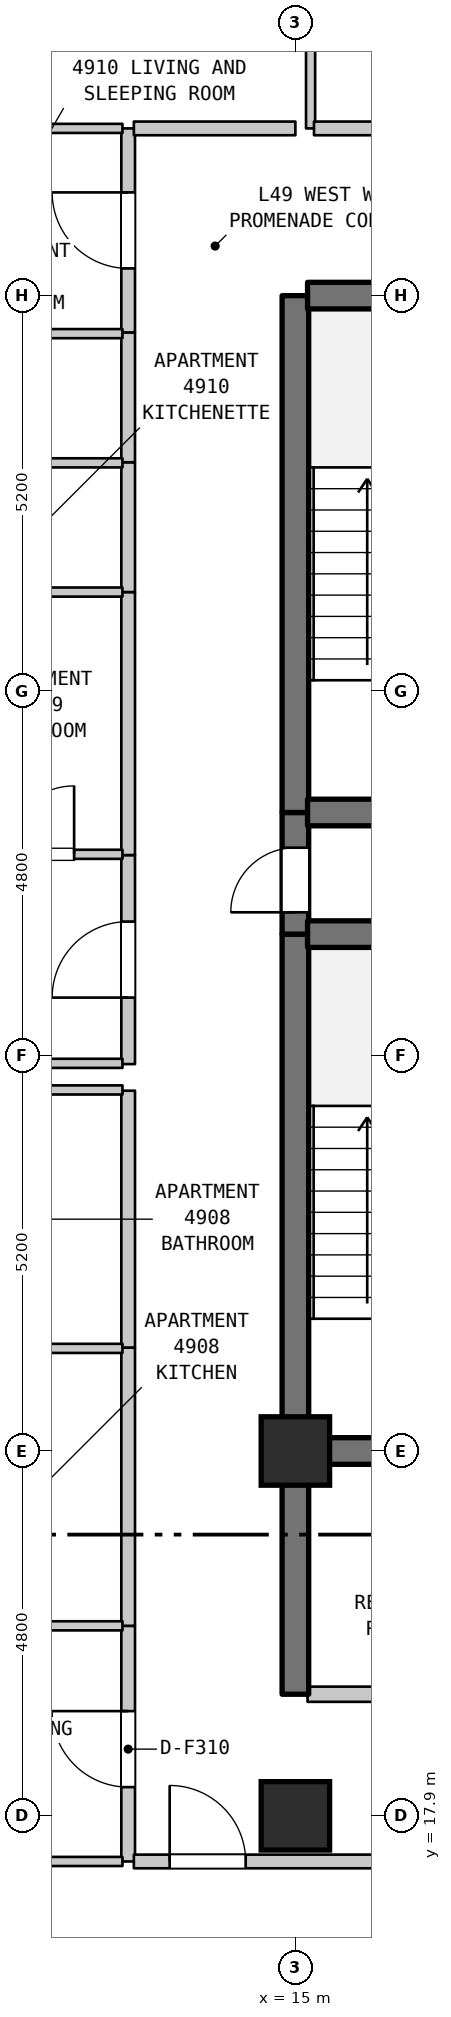
"""IFC4 building model, lengths in metres.
Left out: names, types, materials, properties, quantities, classifications, styles, units other than length and angle.
Written with IfcOpenShell. Run it as: python <this file> out.ifc"""

import sys

from ifc_helpers import new_model, si_unit, direction, frame, frame_2d, origin, origin_2d, place, context, subcontext, project, spatial, rectangle, extrude, element, fill, save


model = new_model("IFC4")
c1 = context("Model", 3, precision=1e-05, world=origin(), true_north=direction((0.0, 1.0)))
c2 = subcontext(c1, "Body", "Model", "MODEL_VIEW")
j1 = project(units=[si_unit("LENGTHUNIT", "METRE"), si_unit("PLANEANGLEUNIT", "RADIAN")], contexts=[c1])
p1 = place(None, origin())
s1 = spatial("IfcSite", under=j1, at=p1, CompositionType="ELEMENT")
p2 = place(p1, origin())
s2 = spatial("IfcBuilding", under=s1, at=p2, CompositionType="ELEMENT")
p3 = place(p2, frame((0.0, 0.0, 199.5)))
s3 = spatial("IfcBuildingStorey", under=s2, at=p3, CompositionType="ELEMENT", Elevation=199.5)
for number, where, z_axis, x_axis in (
    (1, (15.0, 17.9, 0.0), (0.0, 0.0, 1.0), (1.0, 0.0, 0.0)),
    (2, (15.0, 22.7, 0.0), (0.0, 0.0, 1.0), (1.0, 0.0, 0.0)),
):
    element("IfcColumn", number, at=place(p3, frame(where, z_axis=z_axis, x_axis=x_axis)), inside=s3, PredefinedType="COLUMN", context=c2, shape_type="SweptSolid", body=[
        extrude(rectangle(XDim=0.9, YDim=0.9, at=origin_2d()), origin(), (0.0, 0.0, 1.0), 3.7),
    ])
p4 = place(p3, frame((12.8, 17.3, 0.0), z_axis=(0.0, 0.0, 1.0), x_axis=(0.0, 1.0, 0.0)))
e3 = element("IfcWall", 3, at=p4, inside=s3, PredefinedType="STANDARD", context=c2, shape_type="SweptSolid", body=[
    extrude(rectangle(XDim=3.1, YDim=0.18, at=frame_2d((1.55, 0.0))), origin(), (0.0, 0.0, 1.0), 3.39),
])
p5 = place(p4, frame((0.978, 0.0, 0.0)))
e4 = element("IfcOpeningElement", 4, at=p5, cuts=e3, PredefinedType="OPENING", context=c2, shape_type="SweptSolid", body=[
    extrude(rectangle(XDim=1.0, YDim=2.15, at=frame_2d((0.5, 1.075))), frame((0.0, 0.1, 0.0), z_axis=(0.0, -1.0, 0.0), x_axis=(1.0, 0.0, 0.0)), (0.0, 0.0, 1.0), 0.2),
])
p6 = place(p3, frame((12.8, 20.4, 0.0), z_axis=(0.0, 0.0, 1.0), x_axis=(0.0, 1.0, 0.0)))
e5 = element("IfcWall", 5, at=p6, inside=s3, PredefinedType="STANDARD", context=c2, shape_type="SweptSolid", body=[
    extrude(rectangle(XDim=3.661, YDim=0.18, at=frame_2d((1.831, 0.0))), origin(), (0.0, 0.0, 1.0), 3.39),
])
p7 = place(p3, frame((12.8, 24.061, 0.0), z_axis=(0.0, 0.0, 1.0), x_axis=(0.0, 1.0, 0.0)))
e6 = element("IfcWall", 6, at=p7, inside=s3, PredefinedType="STANDARD", context=c2, shape_type="SweptSolid", body=[
    extrude(rectangle(XDim=3.379, YDim=0.18, at=frame_2d((1.689, 0.0))), origin(), (0.0, 0.0, 1.0), 3.39),
])
p8 = place(p3, frame((12.8, 27.79, 0.0), z_axis=(0.0, 0.0, 1.0), x_axis=(0.0, 1.0, 0.0)))
e7 = element("IfcWall", 7, at=p8, inside=s3, PredefinedType="STANDARD", context=c2, shape_type="SweptSolid", body=[
    extrude(rectangle(XDim=2.75, YDim=0.18, at=frame_2d((1.375, 0.0))), origin(), (0.0, 0.0, 1.0), 3.39),
])
p9 = place(p8, frame((0.875, 0.0, 0.0)))
e8 = element("IfcOpeningElement", 8, at=p9, cuts=e7, PredefinedType="OPENING", context=c2, shape_type="SweptSolid", body=[
    extrude(rectangle(XDim=1.0, YDim=2.15, at=frame_2d((0.5, 1.075))), frame((0.0, 0.1, 0.0), z_axis=(0.0, -1.0, 0.0), x_axis=(1.0, 0.0, 0.0)), (0.0, 0.0, 1.0), 0.2),
])
p10 = place(p3, frame((12.8, 30.54, 0.0), z_axis=(0.0, 0.0, 1.0), x_axis=(0.0, 1.0, 0.0)))
e9 = element("IfcWall", 9, at=p10, inside=s3, PredefinedType="STANDARD", context=c2, shape_type="SweptSolid", body=[
    extrude(rectangle(XDim=3.46, YDim=0.18, at=frame_2d((1.73, 0.0))), origin(), (0.0, 0.0, 1.0), 3.39),
])
for number, where, z_axis, x_axis in (
    (10, (12.8, 34.0, 0.0), (0.0, 0.0, 1.0), (0.0, 1.0, 0.0)),
    (11, (12.8, 35.708, 0.0), (0.0, 0.0, 1.0), (0.0, 1.0, 0.0)),
):
    element("IfcWall", number, at=place(p3, frame(where, z_axis=z_axis, x_axis=x_axis)), inside=s3, PredefinedType="STANDARD", context=c2, shape_type="SweptSolid", body=[
        extrude(rectangle(XDim=1.708, YDim=0.18, at=frame_2d((0.854, 0.0))), origin(), (0.0, 0.0, 1.0), 3.39),
    ])
p11 = place(p3, frame((12.8, 37.416, 0.0), z_axis=(0.0, 0.0, 1.0), x_axis=(0.0, 1.0, 0.0)))
e12 = element("IfcWall", 12, at=p11, inside=s3, PredefinedType="STANDARD", context=c2, shape_type="SweptSolid", body=[
    extrude(rectangle(XDim=2.684, YDim=0.18, at=frame_2d((1.342, 0.0))), origin(), (0.0, 0.0, 1.0), 3.39),
])
p12 = place(p11, frame((0.842, 0.0, 0.0)))
e13 = element("IfcOpeningElement", 13, at=p12, cuts=e12, PredefinedType="OPENING", context=c2, shape_type="SweptSolid", body=[
    extrude(rectangle(XDim=1.0, YDim=2.15, at=frame_2d((0.5, 1.075))), frame((0.0, 0.1, 0.0), z_axis=(0.0, -1.0, 0.0), x_axis=(1.0, 0.0, 0.0)), (0.0, 0.0, 1.0), 0.2),
])
p13 = place(p3, frame((15.0, 19.5, 0.0), z_axis=(0.0, 0.0, 1.0), x_axis=(0.0, 1.0, 0.0)))
e14 = element("IfcWall", 14, at=p13, inside=s3, PredefinedType="SHEAR", context=c2, shape_type="SweptSolid", body=[
    extrude(rectangle(XDim=3.2, YDim=0.35, at=frame_2d((1.6, 0.0))), origin(), (0.0, 0.0, 1.0), 3.39),
])
p14 = place(p3, frame((15.0, 22.7, 0.0), z_axis=(0.0, 0.0, 1.0), x_axis=(0.0, 1.0, 0.0)))
e15 = element("IfcWall", 15, at=p14, inside=s3, PredefinedType="SHEAR", context=c2, shape_type="SweptSolid", body=[
    extrude(rectangle(XDim=6.8, YDim=0.35, at=frame_2d((3.4, 0.0))), origin(), (0.0, 0.0, 1.0), 3.39),
])
p15 = place(p3, frame((15.0, 29.5, 0.0), z_axis=(0.0, 0.0, 1.0), x_axis=(0.0, 1.0, 0.0)))
e16 = element("IfcWall", 16, at=p15, inside=s3, PredefinedType="SHEAR", context=c2, shape_type="SweptSolid", body=[
    extrude(rectangle(XDim=1.6, YDim=0.35, at=frame_2d((0.8, 0.0))), origin(), (0.0, 0.0, 1.0), 3.39),
])
p16 = place(p15, frame((0.287, 0.0, 0.0)))
e17 = element("IfcOpeningElement", 17, at=p16, cuts=e16, PredefinedType="OPENING", context=c2, shape_type="SweptSolid", body=[
    extrude(rectangle(XDim=0.85, YDim=2.1, at=frame_2d((0.425, 1.05))), frame((0.0, 0.185, 0.0), z_axis=(0.0, -1.0, 0.0), x_axis=(1.0, 0.0, 0.0)), (0.0, 0.0, 1.0), 0.37),
])
p17 = place(p3, frame((15.0, 31.1, 0.0), z_axis=(0.0, 0.0, 1.0), x_axis=(0.0, 1.0, 0.0)))
e18 = element("IfcWall", 18, at=p17, inside=s3, PredefinedType="SHEAR", context=c2, shape_type="SweptSolid", body=[
    extrude(rectangle(XDim=6.8, YDim=0.35, at=frame_2d((3.4, 0.0))), origin(), (0.0, 0.0, 1.0), 3.39),
])
p18 = place(p3, frame((15.2, 40.1, 0.0), z_axis=(0.0, 0.0, 1.0), x_axis=(0.0, 1.0, 0.0)))
e19 = element("IfcWall", 19, at=p18, inside=s3, PredefinedType="PARTITIONING", context=c2, shape_type="SweptSolid", body=[
    extrude(rectangle(XDim=3.2, YDim=0.12, at=frame_2d((1.6, 0.0))), origin(), (0.0, 0.0, 1.0), 3.39),
])
p19 = place(p3, frame((9.085, 17.3, 0.0), z_axis=(0.0, 0.0, 1.0), x_axis=(1.0, 0.0, 0.0)))
e20 = element("IfcWall", 20, at=p19, inside=s3, PredefinedType="PARTITIONING", context=c2, shape_type="SweptSolid", body=[
    extrude(rectangle(XDim=3.64, YDim=0.12, at=frame_2d((1.82, 0.0))), origin(), (0.0, 0.0, 1.0), 3.39),
])
p20 = place(p3, frame((12.875, 17.3, 0.0), z_axis=(0.0, 0.0, 1.0), x_axis=(1.0, 0.0, 0.0)))
e21 = element("IfcWall", 21, at=p20, inside=s3, PredefinedType="STANDARD", context=c2, shape_type="SweptSolid", body=[
    extrude(rectangle(XDim=3.28, YDim=0.18, at=frame_2d((1.64, 0.0))), origin(), (0.0, 0.0, 1.0), 3.39),
])
p21 = place(p20, frame((0.471, 0.0, 0.0)))
e22 = element("IfcOpeningElement", 22, at=p21, cuts=e21, PredefinedType="OPENING", context=c2, shape_type="SweptSolid", body=[
    extrude(rectangle(XDim=1.0, YDim=2.15, at=frame_2d((0.5, 1.075))), frame((0.0, 0.1, 0.0), z_axis=(0.0, -1.0, 0.0), x_axis=(1.0, 0.0, 0.0)), (0.0, 0.0, 1.0), 0.2),
])
p22 = place(p3, frame((15.16, 19.5, 0.0), z_axis=(0.0, 0.0, 1.0), x_axis=(1.0, 0.0, 0.0)))
e23 = element("IfcWall", 23, at=p22, inside=s3, PredefinedType="STANDARD", context=c2, shape_type="SweptSolid", body=[
    extrude(rectangle(XDim=3.68, YDim=0.2, at=frame_2d((1.84, 0.0))), origin(), (0.0, 0.0, 1.0), 3.39),
])
p23 = place(p22, frame((1.39, 0.0, 0.0)))
e24 = element("IfcOpeningElement", 24, at=p23, cuts=e23, PredefinedType="OPENING", context=c2, shape_type="SweptSolid", body=[
    extrude(rectangle(XDim=0.9, YDim=2.15, at=frame_2d((0.45, 1.075))), frame((0.0, 0.11, 0.0), z_axis=(0.0, -1.0, 0.0), x_axis=(1.0, 0.0, 0.0)), (0.0, 0.0, 1.0), 0.22),
])
p24 = place(p3, frame((10.595, 20.4, 0.0), z_axis=(0.0, 0.0, 1.0), x_axis=(1.0, 0.0, 0.0)))
e25 = element("IfcWall", 25, at=p24, inside=s3, PredefinedType="PARTITIONING", context=c2, shape_type="SweptSolid", body=[
    extrude(rectangle(XDim=2.13, YDim=0.12, at=frame_2d((1.065, 0.0))), origin(), (0.0, 0.0, 1.0), 3.39),
])
p25 = place(p3, frame((15.16, 22.7, 0.0), z_axis=(0.0, 0.0, 1.0), x_axis=(1.0, 0.0, 0.0)))
e26 = element("IfcWall", 26, at=p25, inside=s3, PredefinedType="SHEAR", context=c2, shape_type="SweptSolid", body=[
    extrude(rectangle(XDim=3.68, YDim=0.35, at=frame_2d((1.84, 0.0))), origin(), (0.0, 0.0, 1.0), 3.39),
])
for number, where, z_axis, x_axis in (
    (27, (10.595, 24.05, 0.0), (0.0, 0.0, 1.0), (1.0, 0.0, 0.0)),
    (28, (10.595, 27.45, 0.0), (0.0, 0.0, 1.0), (1.0, 0.0, 0.0)),
):
    element("IfcWall", number, at=place(p3, frame(where, z_axis=z_axis, x_axis=x_axis)), inside=s3, PredefinedType="PARTITIONING", context=c2, shape_type="SweptSolid", body=[
        extrude(rectangle(XDim=2.13, YDim=0.12, at=frame_2d((1.065, 0.0))), origin(), (0.0, 0.0, 1.0), 3.39),
    ])
p26 = place(p3, frame((9.03, 27.8, 0.0), z_axis=(0.0, 0.0, 1.0), x_axis=(1.0, 0.0, 0.0)))
e29 = element("IfcWall", 29, at=p26, inside=s3, PredefinedType="PARTITIONING", context=c2, shape_type="SweptSolid", body=[
    extrude(rectangle(XDim=3.695, YDim=0.12, at=frame_2d((1.848, 0.0))), origin(), (0.0, 0.0, 1.0), 3.39),
])
p27 = place(p3, frame((15.16, 29.5, 0.0), z_axis=(0.0, 0.0, 1.0), x_axis=(1.0, 0.0, 0.0)))
e30 = element("IfcWall", 30, at=p27, inside=s3, PredefinedType="SHEAR", context=c2, shape_type="SweptSolid", body=[
    extrude(rectangle(XDim=3.68, YDim=0.35, at=frame_2d((1.84, 0.0))), origin(), (0.0, 0.0, 1.0), 3.39),
])
p28 = place(p3, frame((10.523, 30.55, 0.0), z_axis=(0.0, 0.0, 1.0), x_axis=(1.0, 0.0, 0.0)))
e31 = element("IfcWall", 31, at=p28, inside=s3, PredefinedType="PARTITIONING", context=c2, shape_type="SweptSolid", body=[
    extrude(rectangle(XDim=2.202, YDim=0.12, at=frame_2d((1.101, 0.0))), origin(), (0.0, 0.0, 1.0), 3.39),
])
p29 = place(p28, frame((0.666, 0.0, 0.0)))
e32 = element("IfcOpeningElement", 32, at=p29, cuts=e31, PredefinedType="OPENING", context=c2, shape_type="SweptSolid", body=[
    extrude(rectangle(XDim=0.9, YDim=2.1, at=frame_2d((0.45, 1.05))), frame((0.0, 0.07, 0.0), z_axis=(0.0, -1.0, 0.0), x_axis=(1.0, 0.0, 0.0)), (0.0, 0.0, 1.0), 0.14),
])
p30 = place(p3, frame((15.16, 31.1, 0.0), z_axis=(0.0, 0.0, 1.0), x_axis=(1.0, 0.0, 0.0)))
e33 = element("IfcWall", 33, at=p30, inside=s3, PredefinedType="SHEAR", context=c2, shape_type="SweptSolid", body=[
    extrude(rectangle(XDim=3.68, YDim=0.35, at=frame_2d((1.84, 0.0))), origin(), (0.0, 0.0, 1.0), 3.39),
])
for number, where, z_axis, x_axis in (
    (34, (10.545, 34.0, 0.0), (0.0, 0.0, 1.0), (1.0, 0.0, 0.0)),
    (35, (10.545, 35.7, 0.0), (0.0, 0.0, 1.0), (1.0, 0.0, 0.0)),
    (36, (10.545, 37.4, 0.0), (0.0, 0.0, 1.0), (1.0, 0.0, 0.0)),
):
    element("IfcWall", number, at=place(p3, frame(where, z_axis=z_axis, x_axis=x_axis)), inside=s3, PredefinedType="PARTITIONING", context=c2, shape_type="SweptSolid", body=[
        extrude(rectangle(XDim=2.18, YDim=0.12, at=frame_2d((1.09, 0.0))), origin(), (0.0, 0.0, 1.0), 3.39),
    ])
p31 = place(p3, frame((15.16, 37.9, 0.0), z_axis=(0.0, 0.0, 1.0), x_axis=(1.0, 0.0, 0.0)))
e37 = element("IfcWall", 37, at=p31, inside=s3, PredefinedType="SHEAR", context=c2, shape_type="SweptSolid", body=[
    extrude(rectangle(XDim=3.68, YDim=0.35, at=frame_2d((1.84, 0.0))), origin(), (0.0, 0.0, 1.0), 3.39),
])
p32 = place(p3, frame((9.702, 40.1, 0.0), z_axis=(0.0, 0.0, 1.0), x_axis=(1.0, 0.0, 0.0)))
e38 = element("IfcWall", 38, at=p32, inside=s3, PredefinedType="PARTITIONING", context=c2, shape_type="SweptSolid", body=[
    extrude(rectangle(XDim=3.023, YDim=0.12, at=frame_2d((1.512, 0.0))), origin(), (0.0, 0.0, 1.0), 3.39),
])
p33 = place(p3, frame((12.875, 40.1, 0.0), z_axis=(0.0, 0.0, 1.0), x_axis=(1.0, 0.0, 0.0)))
e39 = element("IfcWall", 39, at=p33, inside=s3, PredefinedType="STANDARD", context=c2, shape_type="SweptSolid", body=[
    extrude(rectangle(XDim=2.125, YDim=0.18, at=frame_2d((1.062, 0.0))), origin(), (0.0, 0.0, 1.0), 3.39),
])
p34 = place(p3, frame((15.245, 40.1, 0.0), z_axis=(0.0, 0.0, 1.0), x_axis=(1.0, 0.0, 0.0)))
e40 = element("IfcWall", 40, at=p34, inside=s3, PredefinedType="STANDARD", context=c2, shape_type="SweptSolid", body=[
    extrude(rectangle(XDim=2.36, YDim=0.18, at=frame_2d((1.18, 0.0))), origin(), (0.0, 0.0, 1.0), 3.39),
])
p35 = place(p5, origin())
e41 = element("IfcDoor", 41, at=p35, inside=s3, OperationType="SINGLE_SWING_RIGHT", PredefinedType="DOOR", context=c2, shape_type="SweptSolid", body=[
    extrude(rectangle(XDim=1.0, YDim=2.15, at=frame_2d((0.5, 1.075))), frame((0.0, 0.025, 0.0), z_axis=(0.0, -1.0, 0.0), x_axis=(1.0, 0.0, 0.0)), (0.0, 0.0, 1.0), 0.05),
])
fill(e4, e41)
p36 = place(p9, origin())
e42 = element("IfcDoor", 42, at=p36, inside=s3, OperationType="SINGLE_SWING_LEFT", PredefinedType="DOOR", context=c2, shape_type="SweptSolid", body=[
    extrude(rectangle(XDim=1.0, YDim=2.15, at=frame_2d((0.5, 1.075))), frame((0.0, 0.025, 0.0), z_axis=(0.0, -1.0, 0.0), x_axis=(1.0, 0.0, 0.0)), (0.0, 0.0, 1.0), 0.05),
])
fill(e8, e42)
p37 = place(p12, origin())
e43 = element("IfcDoor", 43, at=p37, inside=s3, OperationType="SINGLE_SWING_RIGHT", PredefinedType="DOOR", context=c2, shape_type="SweptSolid", body=[
    extrude(rectangle(XDim=1.0, YDim=2.15, at=frame_2d((0.5, 1.075))), frame((0.0, 0.025, 0.0), z_axis=(0.0, -1.0, 0.0), x_axis=(1.0, 0.0, 0.0)), (0.0, 0.0, 1.0), 0.05),
])
fill(e13, e43)
p38 = place(p16, origin())
e44 = element("IfcDoor", 44, at=p38, inside=s3, OperationType="SINGLE_SWING_LEFT", PredefinedType="DOOR", context=c2, shape_type="SweptSolid", body=[
    extrude(rectangle(XDim=0.85, YDim=2.1, at=frame_2d((0.425, 1.05))), frame((0.0, 0.025, 0.0), z_axis=(0.0, -1.0, 0.0), x_axis=(1.0, 0.0, 0.0)), (0.0, 0.0, 1.0), 0.05),
])
fill(e17, e44)
p39 = place(p21, origin())
e45 = element("IfcDoor", 45, at=p39, inside=s3, OperationType="SINGLE_SWING_LEFT", PredefinedType="DOOR", context=c2, shape_type="SweptSolid", body=[
    extrude(rectangle(XDim=1.0, YDim=2.15, at=frame_2d((0.5, 1.075))), frame((0.0, 0.025, 0.0), z_axis=(0.0, -1.0, 0.0), x_axis=(1.0, 0.0, 0.0)), (0.0, 0.0, 1.0), 0.05),
])
fill(e22, e45)
p40 = place(p29, origin())
e46 = element("IfcDoor", 46, at=p40, inside=s3, OperationType="SINGLE_SWING_RIGHT", PredefinedType="DOOR", context=c2, shape_type="SweptSolid", body=[
    extrude(rectangle(XDim=0.9, YDim=2.1, at=frame_2d((0.45, 1.05))), frame((0.0, 0.025, 0.0), z_axis=(0.0, -1.0, 0.0), x_axis=(1.0, 0.0, 0.0)), (0.0, 0.0, 1.0), 0.05),
])
fill(e32, e46)
save(model, sys.argv[1])
